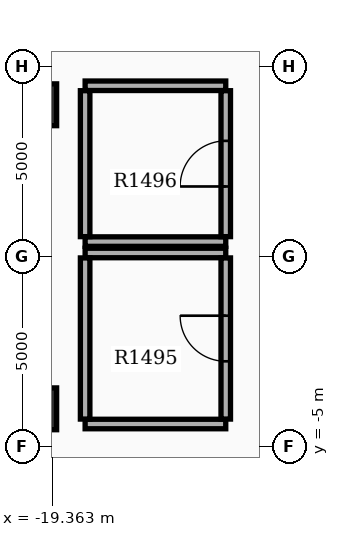
"""IFC4 building model, lengths in metres.
Left out: names, types, materials, properties, quantities, classifications, styles, units other than length and angle.
Written with IfcOpenShell. Run it as: python <this file> out.ifc"""

import sys

from ifc_helpers import new_model, si_unit, direction, frame, frame_2d, origin, origin_2d, place, context, subcontext, project, spatial, rectangle, extrude, element, fill, save


model = new_model("IFC4")
c1 = context("Model", 3, precision=1e-05, world=origin(), true_north=direction((0.0, 1.0)))
c2 = subcontext(c1, "Body", "Model", "MODEL_VIEW")
j1 = project(units=[si_unit("LENGTHUNIT", "METRE"), si_unit("PLANEANGLEUNIT", "RADIAN")], contexts=[c1])
p1 = place(None, origin())
s1 = spatial("IfcSite", under=j1, at=p1, CompositionType="ELEMENT")
p2 = place(p1, origin())
s2 = spatial("IfcBuilding", under=s1, at=p2, CompositionType="ELEMENT")
p3 = place(p2, frame((0.0, 0.0, 95.1)))
s3 = spatial("IfcBuildingStorey", under=s2, at=p3, CompositionType="ELEMENT", Elevation=95.1)
for number, where, z_axis, x_axis in (
    (1, (-19.8, -4.0, 0.0), (0.0, 0.0, 1.0), (1.0, 0.0, 0.0)),
    (2, (-19.8, 4.0, 0.0), (0.0, 0.0, 1.0), (1.0, 0.0, 0.0)),
):
    element("IfcColumn", number, at=place(p3, frame(where, z_axis=z_axis, x_axis=x_axis)), inside=s3, PredefinedType="COLUMN", context=c2, shape_type="SweptSolid", body=[
        extrude(rectangle(XDim=1.1, YDim=1.1, at=origin_2d()), origin(), (0.0, 0.0, 1.0), 5.1),
    ])
for number, where, z_axis, x_axis in (
    (3, (-18.5, -4.4, 0.0), (0.0, 0.0, 1.0), (1.0, 0.0, 0.0)),
    (4, (-18.5, 0.1, 0.0), (0.0, 0.0, 1.0), (1.0, 0.0, 0.0)),
):
    element("IfcWall", number, at=place(p3, frame(where, z_axis=z_axis, x_axis=x_axis)), inside=s3, PredefinedType="SOLIDWALL", context=c2, shape_type="SweptSolid", body=[
        extrude(rectangle(XDim=3.7, YDim=0.25, at=frame_2d((1.85, 0.0))), origin(), (0.0, 0.0, 1.0), 3.92),
    ])
p4 = place(p3, frame((-18.5, -4.27, 0.0), z_axis=(0.0, 0.0, 1.0), x_axis=(0.0, 1.0, 0.0)))
e5 = element("IfcWall", 5, at=p4, inside=s3, PredefinedType="SOLIDWALL", context=c2, shape_type="SweptSolid", body=[
    extrude(rectangle(XDim=4.24, YDim=0.25, at=frame_2d((2.12, 0.0))), origin(), (0.0, 0.0, 1.0), 3.92),
])
p5 = place(p3, frame((-14.8, -4.27, 0.0), z_axis=(0.0, 0.0, 1.0), x_axis=(0.0, 1.0, 0.0)))
e6 = element("IfcWall", 6, at=p5, inside=s3, PredefinedType="SOLIDWALL", context=c2, shape_type="SweptSolid", body=[
    extrude(rectangle(XDim=4.24, YDim=0.25, at=frame_2d((2.12, 0.0))), origin(), (0.0, 0.0, 1.0), 3.92),
])
p6 = place(p5, frame((1.52, 0.0, 0.0)))
e7 = element("IfcOpeningElement", 7, at=p6, cuts=e6, PredefinedType="OPENING", context=c2, shape_type="SweptSolid", body=[
    extrude(rectangle(XDim=1.2, YDim=2.15, at=frame_2d((0.6, 1.075))), frame((0.0, 0.135, 0.0), z_axis=(0.0, -1.0, 0.0), x_axis=(1.0, 0.0, 0.0)), (0.0, 0.0, 1.0), 0.27),
])
for number, where, z_axis, x_axis in (
    (8, (-18.5, 0.4, 0.0), (0.0, 0.0, 1.0), (1.0, 0.0, 0.0)),
    (9, (-18.5, 4.5, 0.0), (0.0, 0.0, 1.0), (1.0, 0.0, 0.0)),
):
    element("IfcWall", number, at=place(p3, frame(where, z_axis=z_axis, x_axis=x_axis)), inside=s3, PredefinedType="SOLIDWALL", context=c2, shape_type="SweptSolid", body=[
        extrude(rectangle(XDim=3.7, YDim=0.25, at=frame_2d((1.85, 0.0))), origin(), (0.0, 0.0, 1.0), 3.92),
    ])
p7 = place(p3, frame((-18.5, 0.53, 0.0), z_axis=(0.0, 0.0, 1.0), x_axis=(0.0, 1.0, 0.0)))
e10 = element("IfcWall", 10, at=p7, inside=s3, PredefinedType="SOLIDWALL", context=c2, shape_type="SweptSolid", body=[
    extrude(rectangle(XDim=3.84, YDim=0.25, at=frame_2d((1.92, 0.0))), origin(), (0.0, 0.0, 1.0), 3.92),
])
p8 = place(p3, frame((-14.8, 0.53, 0.0), z_axis=(0.0, 0.0, 1.0), x_axis=(0.0, 1.0, 0.0)))
e11 = element("IfcWall", 11, at=p8, inside=s3, PredefinedType="SOLIDWALL", context=c2, shape_type="SweptSolid", body=[
    extrude(rectangle(XDim=3.84, YDim=0.25, at=frame_2d((1.92, 0.0))), origin(), (0.0, 0.0, 1.0), 3.92),
])
p9 = place(p8, frame((1.32, 0.0, 0.0)))
e12 = element("IfcOpeningElement", 12, at=p9, cuts=e11, PredefinedType="OPENING", context=c2, shape_type="SweptSolid", body=[
    extrude(rectangle(XDim=1.2, YDim=2.15, at=frame_2d((0.6, 1.075))), frame((0.0, 0.135, 0.0), z_axis=(0.0, -1.0, 0.0), x_axis=(1.0, 0.0, 0.0)), (0.0, 0.0, 1.0), 0.27),
])
p10 = place(p6, origin())
e13 = element("IfcDoor", 13, at=p10, inside=s3, OperationType="SINGLE_SWING_RIGHT", PredefinedType="DOOR", context=c2, shape_type="SweptSolid", body=[
    extrude(rectangle(XDim=1.2, YDim=2.15, at=frame_2d((0.6, 1.075))), frame((0.0, 0.025, 0.0), z_axis=(0.0, -1.0, 0.0), x_axis=(1.0, 0.0, 0.0)), (0.0, 0.0, 1.0), 0.05),
])
fill(e7, e13)
p11 = place(p9, origin())
e14 = element("IfcDoor", 14, at=p11, inside=s3, OperationType="SINGLE_SWING_LEFT", PredefinedType="DOOR", context=c2, shape_type="SweptSolid", body=[
    extrude(rectangle(XDim=1.2, YDim=2.15, at=frame_2d((0.6, 1.075))), frame((0.0, 0.025, 0.0), z_axis=(0.0, -1.0, 0.0), x_axis=(1.0, 0.0, 0.0)), (0.0, 0.0, 1.0), 0.05),
])
fill(e12, e14)
save(model, sys.argv[1])
